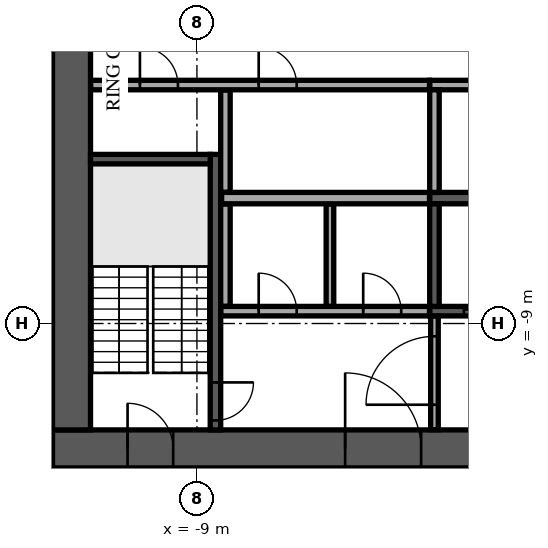
"""IFC4 building model, lengths in metres.
Left out: names, types, materials, properties, quantities, classifications, styles, units other than length and angle.
Written with IfcOpenShell. Run it as: python <this file> out.ifc"""

import sys

from ifc_helpers import new_model, si_unit, direction, frame, frame_2d, origin, place, context, subcontext, project, spatial, rectangle, extrude, element, fill, save


model = new_model("IFC4")
c1 = context("Model", 3, precision=1e-05, world=origin(), true_north=direction((0.0, 1.0)))
c2 = subcontext(c1, "Body", "Model", "MODEL_VIEW")
j1 = project(units=[si_unit("LENGTHUNIT", "METRE"), si_unit("PLANEANGLEUNIT", "RADIAN")], contexts=[c1])
p1 = place(None, origin())
s1 = spatial("IfcSite", under=j1, at=p1, CompositionType="ELEMENT")
p2 = place(p1, origin())
s2 = spatial("IfcBuilding", under=s1, at=p2, CompositionType="ELEMENT")
p3 = place(p2, frame((0.0, 0.0, 175.7)))
s3 = spatial("IfcBuildingStorey", under=s2, at=p3, CompositionType="ELEMENT", Elevation=175.7)
p4 = place(p3, frame((-12.8, -12.3, 0.0), z_axis=(0.0, 0.0, 1.0), x_axis=(1.0, 0.0, 0.0)))
e1 = element("IfcWall", 1, at=p4, inside=s3, PredefinedType="SHEAR", context=c2, shape_type="SweptSolid", body=[
    extrude(rectangle(XDim=25.6, YDim=1.0, at=frame_2d((12.8, 0.0))), origin(), (0.0, 0.0, 1.0), 3.6),
])
p5 = place(p4, frame((7.7, 0.0, 0.0)))
e2 = element("IfcOpeningElement", 2, at=p5, cuts=e1, PredefinedType="OPENING", context=c2, shape_type="SweptSolid", body=[
    extrude(rectangle(XDim=2.0, YDim=2.1, at=frame_2d((1.0, 1.05))), frame((0.0, 0.51, 0.0), z_axis=(0.0, -1.0, 0.0), x_axis=(1.0, 0.0, 0.0)), (0.0, 0.0, 1.0), 1.02),
])
p6 = place(p4, frame((17.825, 0.0, 0.0)))
e3 = element("IfcOpeningElement", 3, at=p6, cuts=e1, PredefinedType="OPENING", context=c2, shape_type="SweptSolid", body=[
    extrude(rectangle(XDim=1.2, YDim=2.1, at=frame_2d((0.6, 1.05))), frame((0.0, 0.51, 0.0), z_axis=(0.0, -1.0, 0.0), x_axis=(1.0, 0.0, 0.0)), (0.0, 0.0, 1.0), 1.02),
])
p7 = place(p4, frame((1.975, 0.0, 0.0)))
e4 = element("IfcOpeningElement", 4, at=p7, cuts=e1, PredefinedType="OPENING", context=c2, shape_type="SweptSolid", body=[
    extrude(rectangle(XDim=1.2, YDim=2.1, at=frame_2d((0.6, 1.05))), frame((0.0, 0.51, 0.0), z_axis=(0.0, -1.0, 0.0), x_axis=(1.0, 0.0, 0.0)), (0.0, 0.0, 1.0), 1.02),
])
p8 = place(p4, frame((22.425, 0.0, 0.0)))
e5 = element("IfcOpeningElement", 5, at=p8, cuts=e1, PredefinedType="OPENING", context=c2, shape_type="SweptSolid", body=[
    extrude(rectangle(XDim=1.2, YDim=2.1, at=frame_2d((0.6, 1.05))), frame((0.0, 0.51, 0.0), z_axis=(0.0, -1.0, 0.0), x_axis=(1.0, 0.0, 0.0)), (0.0, 0.0, 1.0), 1.02),
])
p9 = place(p3, frame((-12.3, -11.8, 0.0), z_axis=(0.0, 0.0, 1.0), x_axis=(0.0, 1.0, 0.0)))
e6 = element("IfcWall", 6, at=p9, inside=s3, PredefinedType="SHEAR", context=c2, shape_type="SweptSolid", body=[
    extrude(rectangle(XDim=23.6, YDim=1.0, at=frame_2d((11.8, 0.0))), origin(), (0.0, 0.0, 1.0), 3.6),
])
p10 = place(p9, frame((10.6, 0.0, 0.0)))
e7 = element("IfcOpeningElement", 7, at=p10, cuts=e6, PredefinedType="OPENING", context=c2, shape_type="SweptSolid", body=[
    extrude(rectangle(XDim=2.4, YDim=2.4, at=frame_2d((1.2, 1.2))), frame((0.0, 0.51, 0.0), z_axis=(0.0, -1.0, 0.0), x_axis=(1.0, 0.0, 0.0)), (0.0, 0.0, 1.0), 1.02),
])
p11 = place(p3, frame((-2.875, -5.7, 0.0), z_axis=(0.0, 0.0, 1.0), x_axis=(1.0, 0.0, 0.0)))
e8 = element("IfcWall", 8, at=p11, inside=s3, PredefinedType="SOLIDWALL", context=c2, shape_type="SweptSolid", body=[
    extrude(rectangle(XDim=11.25, YDim=0.3, at=frame_2d((5.625, 0.0))), origin(), (0.0, 0.0, 1.0), 3.6),
])
p12 = place(p3, frame((-2.875, -2.725, 0.0), z_axis=(0.0, 0.0, 1.0), x_axis=(1.0, 0.0, 0.0)))
e9 = element("IfcWall", 9, at=p12, inside=s3, PredefinedType="SOLIDWALL", context=c2, shape_type="SweptSolid", body=[
    extrude(rectangle(XDim=8.5, YDim=0.25, at=frame_2d((4.25, 0.0))), origin(), (0.0, 0.0, 1.0), 3.6),
])
p13 = place(p3, frame((-2.75, -5.55, 0.0), z_axis=(0.0, 0.0, 1.0), x_axis=(0.0, 1.0, 0.0)))
e10 = element("IfcWall", 10, at=p13, inside=s3, PredefinedType="SOLIDWALL", context=c2, shape_type="SweptSolid", body=[
    extrude(rectangle(XDim=2.7, YDim=0.25, at=frame_2d((1.35, 0.0))), origin(), (0.0, 0.0, 1.0), 3.6),
])
p14 = place(p3, frame((-2.875, -8.675, 0.0), z_axis=(0.0, 0.0, 1.0), x_axis=(1.0, 0.0, 0.0)))
e11 = element("IfcWall", 11, at=p14, inside=s3, PredefinedType="SOLIDWALL", context=c2, shape_type="SweptSolid", body=[
    extrude(rectangle(XDim=11.25, YDim=0.25, at=frame_2d((5.625, 0.0))), origin(), (0.0, 0.0, 1.0), 3.6),
])
p15 = place(p14, frame((0.9, 0.0, 0.0)))
e12 = element("IfcOpeningElement", 12, at=p15, cuts=e11, PredefinedType="OPENING", context=c2, shape_type="SweptSolid", body=[
    extrude(rectangle(XDim=1.2, YDim=2.1, at=frame_2d((0.6, 1.05))), frame((0.0, 0.135, 0.0), z_axis=(0.0, -1.0, 0.0), x_axis=(1.0, 0.0, 0.0)), (0.0, 0.0, 1.0), 0.27),
])
p16 = place(p14, frame((3.65, 0.0, 0.0)))
e13 = element("IfcOpeningElement", 13, at=p16, cuts=e11, PredefinedType="OPENING", context=c2, shape_type="SweptSolid", body=[
    extrude(rectangle(XDim=1.2, YDim=2.1, at=frame_2d((0.6, 1.05))), frame((0.0, 0.135, 0.0), z_axis=(0.0, -1.0, 0.0), x_axis=(1.0, 0.0, 0.0)), (0.0, 0.0, 1.0), 0.27),
])
p17 = place(p14, frame((6.4, 0.0, 0.0)))
e14 = element("IfcOpeningElement", 14, at=p17, cuts=e11, PredefinedType="OPENING", context=c2, shape_type="SweptSolid", body=[
    extrude(rectangle(XDim=1.2, YDim=2.1, at=frame_2d((0.6, 1.05))), frame((0.0, 0.135, 0.0), z_axis=(0.0, -1.0, 0.0), x_axis=(1.0, 0.0, 0.0)), (0.0, 0.0, 1.0), 0.27),
])
p18 = place(p14, frame((9.15, 0.0, 0.0)))
e15 = element("IfcOpeningElement", 15, at=p18, cuts=e11, PredefinedType="OPENING", context=c2, shape_type="SweptSolid", body=[
    extrude(rectangle(XDim=1.2, YDim=2.1, at=frame_2d((0.6, 1.05))), frame((0.0, 0.135, 0.0), z_axis=(0.0, -1.0, 0.0), x_axis=(1.0, 0.0, 0.0)), (0.0, 0.0, 1.0), 0.27),
])
p19 = place(p3, frame((-2.75, -8.55, 0.0), z_axis=(0.0, 0.0, 1.0), x_axis=(0.0, 1.0, 0.0)))
e16 = element("IfcWall", 16, at=p19, inside=s3, PredefinedType="SOLIDWALL", context=c2, shape_type="SweptSolid", body=[
    extrude(rectangle(XDim=2.7, YDim=0.25, at=frame_2d((1.35, 0.0))), origin(), (0.0, 0.0, 1.0), 3.6),
])
p20 = place(p3, frame((-8.512, -4.55, 0.0), z_axis=(0.0, 0.0, 1.0), x_axis=(0.0, -1.0, 0.0)))
e17 = element("IfcWall", 17, at=p20, inside=s3, PredefinedType="SOLIDWALL", context=c2, shape_type="SweptSolid", body=[
    extrude(rectangle(XDim=7.25, YDim=0.275, at=frame_2d((3.625, 0.0))), origin(), (0.0, 0.0, 1.0), 3.6),
])
p21 = place(p20, frame((6.0, 0.0, 0.0)))
e18 = element("IfcOpeningElement", 18, at=p21, cuts=e17, PredefinedType="OPENING", context=c2, shape_type="SweptSolid", body=[
    extrude(rectangle(XDim=1.0, YDim=2.1, at=frame_2d((0.5, 1.05))), frame((0.0, 0.147, 0.0), z_axis=(0.0, -1.0, 0.0), x_axis=(1.0, 0.0, 0.0)), (0.0, 0.0, 1.0), 0.295),
])
p22 = place(p3, frame((-8.65, -4.675, 0.0), z_axis=(0.0, 0.0, 1.0), x_axis=(-1.0, 0.0, 0.0)))
e19 = element("IfcWall", 19, at=p22, inside=s3, PredefinedType="SOLIDWALL", context=c2, shape_type="SweptSolid", body=[
    extrude(rectangle(XDim=3.15, YDim=0.25, at=frame_2d((1.575, 0.0))), origin(), (0.0, 0.0, 1.0), 3.6),
])
p23 = place(p3, frame((-2.75, -11.795, 0.0), z_axis=(0.0, 0.0, 1.0), x_axis=(0.0, 1.0, 0.0)))
e20 = element("IfcWall", 20, at=p23, inside=s3, PredefinedType="PARTITIONING", context=c2, shape_type="SweptSolid", body=[
    extrude(rectangle(XDim=2.99, YDim=0.2, at=frame_2d((1.495, 0.0))), origin(), (0.0, 0.0, 1.0), 3.6),
])
p24 = place(p23, frame((0.657, 0.0, 0.0)))
e21 = element("IfcOpeningElement", 21, at=p24, cuts=e20, PredefinedType="OPENING", context=c2, shape_type="SweptSolid", body=[
    extrude(rectangle(XDim=1.8, YDim=2.1, at=frame_2d((0.9, 1.05))), frame((0.0, 0.11, 0.0), z_axis=(0.0, -1.0, 0.0), x_axis=(1.0, 0.0, 0.0)), (0.0, 0.0, 1.0), 0.22),
])
p25 = place(p3, frame((-8.37, -8.675, 0.0), z_axis=(0.0, 0.0, 1.0), x_axis=(1.0, 0.0, 0.0)))
e22 = element("IfcWall", 22, at=p25, inside=s3, PredefinedType="PARTITIONING", context=c2, shape_type="SweptSolid", body=[
    extrude(rectangle(XDim=5.49, YDim=0.25, at=frame_2d((2.745, 0.0))), origin(), (0.0, 0.0, 1.0), 3.6),
])
p26 = place(p25, frame((0.995, 0.0, 0.0)))
e23 = element("IfcOpeningElement", 23, at=p26, cuts=e22, PredefinedType="OPENING", context=c2, shape_type="SweptSolid", body=[
    extrude(rectangle(XDim=1.0, YDim=2.1, at=frame_2d((0.5, 1.05))), frame((0.0, 0.135, 0.0), z_axis=(0.0, -1.0, 0.0), x_axis=(1.0, 0.0, 0.0)), (0.0, 0.0, 1.0), 0.27),
])
p27 = place(p25, frame((3.745, 0.0, 0.0)))
e24 = element("IfcOpeningElement", 24, at=p27, cuts=e22, PredefinedType="OPENING", context=c2, shape_type="SweptSolid", body=[
    extrude(rectangle(XDim=1.0, YDim=2.1, at=frame_2d((0.5, 1.05))), frame((0.0, 0.135, 0.0), z_axis=(0.0, -1.0, 0.0), x_axis=(1.0, 0.0, 0.0)), (0.0, 0.0, 1.0), 0.27),
])
p28 = place(p3, frame((-8.25, -8.545, 0.0), z_axis=(0.0, 0.0, 1.0), x_axis=(0.0, 1.0, 0.0)))
e25 = element("IfcWall", 25, at=p28, inside=s3, PredefinedType="PARTITIONING", context=c2, shape_type="SweptSolid", body=[
    extrude(rectangle(XDim=2.69, YDim=0.25, at=frame_2d((1.345, 0.0))), origin(), (0.0, 0.0, 1.0), 3.6),
])
p29 = place(p3, frame((-5.5, -8.545, 0.0), z_axis=(0.0, 0.0, 1.0), x_axis=(0.0, 1.0, 0.0)))
e26 = element("IfcWall", 26, at=p29, inside=s3, PredefinedType="PARTITIONING", context=c2, shape_type="SweptSolid", body=[
    extrude(rectangle(XDim=2.69, YDim=0.2, at=frame_2d((1.345, 0.0))), origin(), (0.0, 0.0, 1.0), 3.6),
])
p30 = place(p3, frame((-8.35, -5.7, 0.0), z_axis=(0.0, 0.0, 1.0), x_axis=(1.0, 0.0, 0.0)))
e27 = element("IfcWall", 27, at=p30, inside=s3, PredefinedType="PARTITIONING", context=c2, shape_type="SweptSolid", body=[
    extrude(rectangle(XDim=5.47, YDim=0.3, at=frame_2d((2.735, 0.0))), origin(), (0.0, 0.0, 1.0), 3.6),
])
p31 = place(p3, frame((-8.25, -5.545, 0.0), z_axis=(0.0, 0.0, 1.0), x_axis=(0.0, 1.0, 0.0)))
e28 = element("IfcWall", 28, at=p31, inside=s3, PredefinedType="PARTITIONING", context=c2, shape_type="SweptSolid", body=[
    extrude(rectangle(XDim=2.69, YDim=0.25, at=frame_2d((1.345, 0.0))), origin(), (0.0, 0.0, 1.0), 3.6),
])
p32 = place(p3, frame((-11.795, -2.725, 0.0), z_axis=(0.0, 0.0, 1.0), x_axis=(1.0, 0.0, 0.0)))
e29 = element("IfcWall", 29, at=p32, inside=s3, PredefinedType="PARTITIONING", context=c2, shape_type="SweptSolid", body=[
    extrude(rectangle(XDim=8.915, YDim=0.25, at=frame_2d((4.458, 0.0))), origin(), (0.0, 0.0, 1.0), 3.6),
])
p33 = place(p32, frame((1.295, 0.0, 0.0)))
e30 = element("IfcOpeningElement", 30, at=p33, cuts=e29, PredefinedType="OPENING", context=c2, shape_type="SweptSolid", body=[
    extrude(rectangle(XDim=1.0, YDim=2.1, at=frame_2d((0.5, 1.05))), frame((0.0, 0.135, 0.0), z_axis=(0.0, -1.0, 0.0), x_axis=(1.0, 0.0, 0.0)), (0.0, 0.0, 1.0), 0.27),
])
p34 = place(p32, frame((4.42, 0.0, 0.0)))
e31 = element("IfcOpeningElement", 31, at=p34, cuts=e29, PredefinedType="OPENING", context=c2, shape_type="SweptSolid", body=[
    extrude(rectangle(XDim=1.0, YDim=2.1, at=frame_2d((0.5, 1.05))), frame((0.0, 0.135, 0.0), z_axis=(0.0, -1.0, 0.0), x_axis=(1.0, 0.0, 0.0)), (0.0, 0.0, 1.0), 0.27),
])
p35 = place(p3, frame((-36.503, -1.52, 0.0), z_axis=(0.0, 0.0, 1.0), x_axis=(0.615658293455, -0.788013239546, 0.0)))
e32 = element("IfcWall", 32, at=p35, inside=s3, PredefinedType="STANDARD", context=c2, shape_type="SweptSolid", body=[
    extrude(rectangle(XDim=42.552, YDim=0.6, at=frame_2d((21.276, 0.0))), origin(), (0.0, 0.0, 1.0), 3.6),
])
p36 = place(p35, frame((1.178, 0.0, 0.9)))
e33 = element("IfcOpeningElement", 33, at=p36, cuts=e32, PredefinedType="OPENING", context=c2, shape_type="SweptSolid", body=[
    extrude(rectangle(XDim=1.8, YDim=2.1, at=frame_2d((0.9, 1.05))), frame((0.0, 0.31, 0.0), z_axis=(0.0, -1.0, 0.0), x_axis=(1.0, 0.0, 0.0)), (0.0, 0.0, 1.0), 0.62),
])
p37 = place(p35, frame((5.396, 0.0, 0.9)))
e34 = element("IfcOpeningElement", 34, at=p37, cuts=e32, PredefinedType="OPENING", context=c2, shape_type="SweptSolid", body=[
    extrude(rectangle(XDim=1.8, YDim=2.1, at=frame_2d((0.9, 1.05))), frame((0.0, 0.31, 0.0), z_axis=(0.0, -1.0, 0.0), x_axis=(1.0, 0.0, 0.0)), (0.0, 0.0, 1.0), 0.62),
])
p38 = place(p35, frame((9.676, 0.0, 0.9)))
e35 = element("IfcOpeningElement", 35, at=p38, cuts=e32, PredefinedType="OPENING", context=c2, shape_type="SweptSolid", body=[
    extrude(rectangle(XDim=1.8, YDim=2.1, at=frame_2d((0.9, 1.05))), frame((0.0, 0.31, 0.0), z_axis=(0.0, -1.0, 0.0), x_axis=(1.0, 0.0, 0.0)), (0.0, 0.0, 1.0), 0.62),
])
p39 = place(p35, frame((13.956, 0.0, 0.9)))
e36 = element("IfcOpeningElement", 36, at=p39, cuts=e32, PredefinedType="OPENING", context=c2, shape_type="SweptSolid", body=[
    extrude(rectangle(XDim=1.8, YDim=2.1, at=frame_2d((0.9, 1.05))), frame((0.0, 0.31, 0.0), z_axis=(0.0, -1.0, 0.0), x_axis=(1.0, 0.0, 0.0)), (0.0, 0.0, 1.0), 0.62),
])
p40 = place(p35, frame((18.236, 0.0, 0.9)))
e37 = element("IfcOpeningElement", 37, at=p40, cuts=e32, PredefinedType="OPENING", context=c2, shape_type="SweptSolid", body=[
    extrude(rectangle(XDim=1.8, YDim=2.1, at=frame_2d((0.9, 1.05))), frame((0.0, 0.31, 0.0), z_axis=(0.0, -1.0, 0.0), x_axis=(1.0, 0.0, 0.0)), (0.0, 0.0, 1.0), 0.62),
])
p41 = place(p35, frame((22.516, 0.0, 0.9)))
e38 = element("IfcOpeningElement", 38, at=p41, cuts=e32, PredefinedType="OPENING", context=c2, shape_type="SweptSolid", body=[
    extrude(rectangle(XDim=1.8, YDim=2.1, at=frame_2d((0.9, 1.05))), frame((0.0, 0.31, 0.0), z_axis=(0.0, -1.0, 0.0), x_axis=(1.0, 0.0, 0.0)), (0.0, 0.0, 1.0), 0.62),
])
p42 = place(p35, frame((26.796, 0.0, 0.9)))
e39 = element("IfcOpeningElement", 39, at=p42, cuts=e32, PredefinedType="OPENING", context=c2, shape_type="SweptSolid", body=[
    extrude(rectangle(XDim=1.8, YDim=2.1, at=frame_2d((0.9, 1.05))), frame((0.0, 0.31, 0.0), z_axis=(0.0, -1.0, 0.0), x_axis=(1.0, 0.0, 0.0)), (0.0, 0.0, 1.0), 0.62),
])
p43 = place(p35, frame((35.356, 0.0, 0.9)))
e40 = element("IfcOpeningElement", 40, at=p43, cuts=e32, PredefinedType="OPENING", context=c2, shape_type="SweptSolid", body=[
    extrude(rectangle(XDim=1.8, YDim=2.1, at=frame_2d((0.9, 1.05))), frame((0.0, 0.31, 0.0), z_axis=(0.0, -1.0, 0.0), x_axis=(1.0, 0.0, 0.0)), (0.0, 0.0, 1.0), 0.62),
])
p44 = place(p35, frame((39.573, 0.0, 0.9)))
e41 = element("IfcOpeningElement", 41, at=p44, cuts=e32, PredefinedType="OPENING", context=c2, shape_type="SweptSolid", body=[
    extrude(rectangle(XDim=1.8, YDim=2.1, at=frame_2d((0.9, 1.05))), frame((0.0, 0.31, 0.0), z_axis=(0.0, -1.0, 0.0), x_axis=(1.0, 0.0, 0.0)), (0.0, 0.0, 1.0), 0.62),
])
p45 = place(p3, frame((-3.534, -35.882, 0.0), z_axis=(0.0, 0.0, 1.0), x_axis=(0.788011205374, 0.61566089709, 0.0)))
e42 = element("IfcWall", 42, at=p45, inside=s3, PredefinedType="STANDARD", context=c2, shape_type="SweptSolid", body=[
    extrude(rectangle(XDim=49.752, YDim=0.6, at=frame_2d((24.876, 0.0))), origin(), (0.0, 0.0, 1.0), 3.6),
])
p46 = place(p45, frame((1.161, 0.0, 0.9)))
e43 = element("IfcOpeningElement", 43, at=p46, cuts=e42, PredefinedType="OPENING", context=c2, shape_type="SweptSolid", body=[
    extrude(rectangle(XDim=2.1, YDim=2.1, at=frame_2d((1.05, 1.05))), frame((0.0, 0.31, 0.0), z_axis=(0.0, -1.0, 0.0), x_axis=(1.0, 0.0, 0.0)), (0.0, 0.0, 1.0), 0.62),
])
p47 = place(p45, frame((5.644, 0.0, 0.9)))
e44 = element("IfcOpeningElement", 44, at=p47, cuts=e42, PredefinedType="OPENING", context=c2, shape_type="SweptSolid", body=[
    extrude(rectangle(XDim=2.1, YDim=2.1, at=frame_2d((1.05, 1.05))), frame((0.0, 0.31, 0.0), z_axis=(0.0, -1.0, 0.0), x_axis=(1.0, 0.0, 0.0)), (0.0, 0.0, 1.0), 0.62),
])
p48 = place(p45, frame((10.189, 0.0, 0.9)))
e45 = element("IfcOpeningElement", 45, at=p48, cuts=e42, PredefinedType="OPENING", context=c2, shape_type="SweptSolid", body=[
    extrude(rectangle(XDim=2.1, YDim=2.1, at=frame_2d((1.05, 1.05))), frame((0.0, 0.31, 0.0), z_axis=(0.0, -1.0, 0.0), x_axis=(1.0, 0.0, 0.0)), (0.0, 0.0, 1.0), 0.62),
])
p49 = place(p45, frame((14.735, 0.0, 0.9)))
e46 = element("IfcOpeningElement", 46, at=p49, cuts=e42, PredefinedType="OPENING", context=c2, shape_type="SweptSolid", body=[
    extrude(rectangle(XDim=2.1, YDim=2.1, at=frame_2d((1.05, 1.05))), frame((0.0, 0.31, 0.0), z_axis=(0.0, -1.0, 0.0), x_axis=(1.0, 0.0, 0.0)), (0.0, 0.0, 1.0), 0.62),
])
p50 = place(p45, frame((19.28, 0.0, 0.9)))
e47 = element("IfcOpeningElement", 47, at=p50, cuts=e42, PredefinedType="OPENING", context=c2, shape_type="SweptSolid", body=[
    extrude(rectangle(XDim=2.1, YDim=2.1, at=frame_2d((1.05, 1.05))), frame((0.0, 0.31, 0.0), z_axis=(0.0, -1.0, 0.0), x_axis=(1.0, 0.0, 0.0)), (0.0, 0.0, 1.0), 0.62),
])
p51 = place(p45, frame((23.826, 0.0, 0.9)))
e48 = element("IfcOpeningElement", 48, at=p51, cuts=e42, PredefinedType="OPENING", context=c2, shape_type="SweptSolid", body=[
    extrude(rectangle(XDim=2.1, YDim=2.1, at=frame_2d((1.05, 1.05))), frame((0.0, 0.31, 0.0), z_axis=(0.0, -1.0, 0.0), x_axis=(1.0, 0.0, 0.0)), (0.0, 0.0, 1.0), 0.62),
])
p52 = place(p45, frame((28.371, 0.0, 0.9)))
e49 = element("IfcOpeningElement", 49, at=p52, cuts=e42, PredefinedType="OPENING", context=c2, shape_type="SweptSolid", body=[
    extrude(rectangle(XDim=2.1, YDim=2.1, at=frame_2d((1.05, 1.05))), frame((0.0, 0.31, 0.0), z_axis=(0.0, -1.0, 0.0), x_axis=(1.0, 0.0, 0.0)), (0.0, 0.0, 1.0), 0.62),
])
p53 = place(p45, frame((32.917, 0.0, 0.9)))
e50 = element("IfcOpeningElement", 50, at=p53, cuts=e42, PredefinedType="OPENING", context=c2, shape_type="SweptSolid", body=[
    extrude(rectangle(XDim=2.1, YDim=2.1, at=frame_2d((1.05, 1.05))), frame((0.0, 0.31, 0.0), z_axis=(0.0, -1.0, 0.0), x_axis=(1.0, 0.0, 0.0)), (0.0, 0.0, 1.0), 0.62),
])
p54 = place(p45, frame((37.462, 0.0, 0.9)))
e51 = element("IfcOpeningElement", 51, at=p54, cuts=e42, PredefinedType="OPENING", context=c2, shape_type="SweptSolid", body=[
    extrude(rectangle(XDim=2.1, YDim=2.1, at=frame_2d((1.05, 1.05))), frame((0.0, 0.31, 0.0), z_axis=(0.0, -1.0, 0.0), x_axis=(1.0, 0.0, 0.0)), (0.0, 0.0, 1.0), 0.62),
])
p55 = place(p45, frame((42.008, 0.0, 0.9)))
e52 = element("IfcOpeningElement", 52, at=p55, cuts=e42, PredefinedType="OPENING", context=c2, shape_type="SweptSolid", body=[
    extrude(rectangle(XDim=2.1, YDim=2.1, at=frame_2d((1.05, 1.05))), frame((0.0, 0.31, 0.0), z_axis=(0.0, -1.0, 0.0), x_axis=(1.0, 0.0, 0.0)), (0.0, 0.0, 1.0), 0.62),
])
p56 = place(p45, frame((46.491, 0.0, 0.9)))
e53 = element("IfcOpeningElement", 53, at=p56, cuts=e42, PredefinedType="OPENING", context=c2, shape_type="SweptSolid", body=[
    extrude(rectangle(XDim=2.1, YDim=2.1, at=frame_2d((1.05, 1.05))), frame((0.0, 0.31, 0.0), z_axis=(0.0, -1.0, 0.0), x_axis=(1.0, 0.0, 0.0)), (0.0, 0.0, 1.0), 0.62),
])
p57 = place(p3, frame((-26.789, -3.331, 0.0), z_axis=(0.0, 0.0, 1.0), x_axis=(0.615659714696, -0.788012129158, 0.0)))
e54 = element("IfcWall", 54, at=p57, inside=s3, PredefinedType="PARTITIONING", context=c2, shape_type="SweptSolid", body=[
    extrude(rectangle(XDim=27.811, YDim=0.15, at=frame_2d((13.905, 0.0))), origin(), (0.0, 0.0, 1.0), 3.15),
])
p58 = place(p57, frame((15.872, 0.0, 0.0)))
e55 = element("IfcOpeningElement", 55, at=p58, cuts=e54, PredefinedType="OPENING", context=c2, shape_type="SweptSolid", body=[
    extrude(rectangle(XDim=1.0, YDim=2.1, at=frame_2d((0.5, 1.05))), frame((0.0, 0.085, 0.0), z_axis=(0.0, -1.0, 0.0), x_axis=(1.0, 0.0, 0.0)), (0.0, 0.0, 1.0), 0.17),
])
p59 = place(p5, origin())
e56 = element("IfcDoor", 56, at=p59, inside=s3, OperationType="SINGLE_SWING_LEFT", PredefinedType="DOOR", context=c2, shape_type="SweptSolid", body=[
    extrude(rectangle(XDim=2.0, YDim=2.1, at=frame_2d((1.0, 1.05))), frame((0.0, 0.025, 0.0), z_axis=(0.0, -1.0, 0.0), x_axis=(1.0, 0.0, 0.0)), (0.0, 0.0, 1.0), 0.05),
])
fill(e2, e56)
p60 = place(p7, origin())
e57 = element("IfcDoor", 57, at=p60, inside=s3, OperationType="SINGLE_SWING_LEFT", PredefinedType="DOOR", context=c2, shape_type="SweptSolid", body=[
    extrude(rectangle(XDim=1.2, YDim=2.1, at=frame_2d((0.6, 1.05))), frame((0.0, 0.025, 0.0), z_axis=(0.0, -1.0, 0.0), x_axis=(1.0, 0.0, 0.0)), (0.0, 0.0, 1.0), 0.05),
])
fill(e4, e57)
p61 = place(p15, origin())
e58 = element("IfcDoor", 58, at=p61, inside=s3, OperationType="DOUBLE_DOOR_SLIDING", PredefinedType="DOOR", context=c2, shape_type="SweptSolid", body=[
    extrude(rectangle(XDim=1.2, YDim=2.1, at=frame_2d((0.6, 1.05))), frame((0.0, 0.025, 0.0), z_axis=(0.0, -1.0, 0.0), x_axis=(1.0, 0.0, 0.0)), (0.0, 0.0, 1.0), 0.05),
])
fill(e12, e58)
p62 = place(p21, origin())
e59 = element("IfcDoor", 59, at=p62, inside=s3, OperationType="SINGLE_SWING_LEFT", PredefinedType="DOOR", context=c2, shape_type="SweptSolid", body=[
    extrude(rectangle(XDim=1.0, YDim=2.1, at=frame_2d((0.5, 1.05))), frame((0.0, 0.025, 0.0), z_axis=(0.0, -1.0, 0.0), x_axis=(1.0, 0.0, 0.0)), (0.0, 0.0, 1.0), 0.05),
])
fill(e18, e59)
p63 = place(p26, origin())
e60 = element("IfcDoor", 60, at=p63, inside=s3, OperationType="SINGLE_SWING_RIGHT", PredefinedType="DOOR", context=c2, shape_type="SweptSolid", body=[
    extrude(rectangle(XDim=1.0, YDim=2.1, at=frame_2d((0.5, 1.05))), frame((0.0, 0.025, 0.0), z_axis=(0.0, -1.0, 0.0), x_axis=(1.0, 0.0, 0.0)), (0.0, 0.0, 1.0), 0.05),
])
fill(e23, e60)
p64 = place(p27, origin())
e61 = element("IfcDoor", 61, at=p64, inside=s3, OperationType="SINGLE_SWING_RIGHT", PredefinedType="DOOR", context=c2, shape_type="SweptSolid", body=[
    extrude(rectangle(XDim=1.0, YDim=2.1, at=frame_2d((0.5, 1.05))), frame((0.0, 0.025, 0.0), z_axis=(0.0, -1.0, 0.0), x_axis=(1.0, 0.0, 0.0)), (0.0, 0.0, 1.0), 0.05),
])
fill(e24, e61)
p65 = place(p33, origin())
e62 = element("IfcDoor", 62, at=p65, inside=s3, OperationType="SINGLE_SWING_RIGHT", PredefinedType="DOOR", context=c2, shape_type="SweptSolid", body=[
    extrude(rectangle(XDim=1.0, YDim=2.1, at=frame_2d((0.5, 1.05))), frame((0.0, 0.025, 0.0), z_axis=(0.0, -1.0, 0.0), x_axis=(1.0, 0.0, 0.0)), (0.0, 0.0, 1.0), 0.05),
])
fill(e30, e62)
p66 = place(p34, origin())
e63 = element("IfcDoor", 63, at=p66, inside=s3, OperationType="SINGLE_SWING_RIGHT", PredefinedType="DOOR", context=c2, shape_type="SweptSolid", body=[
    extrude(rectangle(XDim=1.0, YDim=2.1, at=frame_2d((0.5, 1.05))), frame((0.0, 0.025, 0.0), z_axis=(0.0, -1.0, 0.0), x_axis=(1.0, 0.0, 0.0)), (0.0, 0.0, 1.0), 0.05),
])
fill(e31, e63)
p67 = place(p24, origin())
e64 = element("IfcDoor", 64, at=p67, inside=s3, OperationType="SINGLE_SWING_LEFT", PredefinedType="DOOR", context=c2, shape_type="SweptSolid", body=[
    extrude(rectangle(XDim=1.8, YDim=2.1, at=frame_2d((0.9, 1.05))), frame((0.0, 0.025, 0.0), z_axis=(0.0, -1.0, 0.0), x_axis=(1.0, 0.0, 0.0)), (0.0, 0.0, 1.0), 0.05),
])
fill(e21, e64)
save(model, sys.argv[1])
